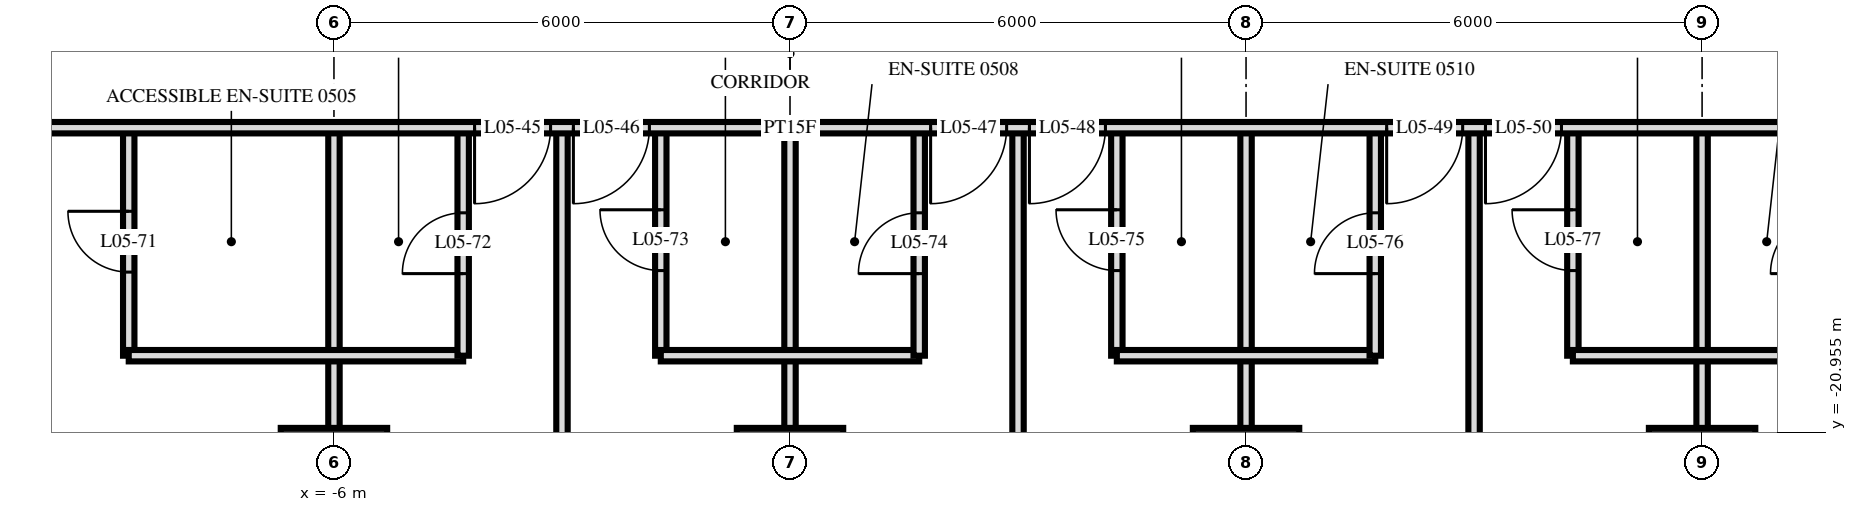
"""IFC4 building model, lengths in metres.
Left out: names, types, materials, properties, quantities, classifications, styles, units other than length and angle.
Written with IfcOpenShell. Run it as: python <this file> out.ifc"""

import sys

from ifc_helpers import new_model, si_unit, direction, frame, frame_2d, origin, origin_2d, place, context, subcontext, project, spatial, rectangle, extrude, element, fill, save


model = new_model("IFC4")
c1 = context("Model", 3, precision=1e-05, world=origin(), true_north=direction((0.0, 1.0)))
c2 = subcontext(c1, "Body", "Model", "MODEL_VIEW")
j1 = project(units=[si_unit("LENGTHUNIT", "METRE"), si_unit("PLANEANGLEUNIT", "RADIAN")], contexts=[c1])
p1 = place(None, origin())
s1 = spatial("IfcSite", under=j1, at=p1, CompositionType="ELEMENT")
p2 = place(p1, origin())
s2 = spatial("IfcBuilding", under=s1, at=p2, CompositionType="ELEMENT")
p3 = place(p2, frame((0.0, 0.0, 27.6)))
s3 = spatial("IfcBuildingStorey", under=s2, at=p3, CompositionType="ELEMENT", Elevation=27.6)
for number, where, z_axis, x_axis in (
    (1, (-6.0, -21.6, 0.0), (0.0, 0.0, 1.0), (1.0, 0.0, 0.0)),
    (2, (0.0, -21.6, 0.0), (0.0, 0.0, 1.0), (1.0, 0.0, 0.0)),
    (3, (6.0, -21.6, 0.0), (0.0, 0.0, 1.0), (1.0, 0.0, 0.0)),
    (4, (12.0, -21.6, 0.0), (0.0, 0.0, 1.0), (1.0, 0.0, 0.0)),
):
    element("IfcColumn", number, at=place(p3, frame(where, z_axis=z_axis, x_axis=x_axis)), inside=s3, PredefinedType="COLUMN", context=c2, shape_type="SweptSolid", body=[
        extrude(rectangle(XDim=1.4, YDim=1.4, at=origin_2d()), origin(), (0.0, 0.0, 1.0), 3.6),
    ])
p4 = place(p3, frame((12.0, -29.22, 0.0), z_axis=(0.0, 0.0, 1.0), x_axis=(0.0, 1.0, 0.0)))
e5 = element("IfcWall", 5, at=p4, inside=s3, PredefinedType="PARTITIONING", context=c2, shape_type="SweptSolid", body=[
    extrude(rectangle(XDim=12.27, YDim=0.15, at=frame_2d((6.135, 0.0))), origin(), (0.0, 0.0, 1.0), 3.32),
])
p5 = place(p3, frame((10.3, -19.95, 0.0), z_axis=(0.0, 0.0, 1.0), x_axis=(0.0, 1.0, 0.0)))
e6 = element("IfcWall", 6, at=p5, inside=s3, PredefinedType="PARTITIONING", context=c2, shape_type="SweptSolid", body=[
    extrude(rectangle(XDim=3.0, YDim=0.15, at=frame_2d((1.5, 0.0))), origin(), (0.0, 0.0, 1.0), 3.32),
])
p6 = place(p5, frame((1.12, 0.0, 0.0)))
e7 = element("IfcOpeningElement", 7, at=p6, cuts=e6, PredefinedType="OPENING", context=c2, shape_type="SweptSolid", body=[
    extrude(rectangle(XDim=0.8, YDim=2.1, at=frame_2d((0.4, 1.05))), frame((0.0, 0.085, 0.0), z_axis=(0.0, -1.0, 0.0), x_axis=(1.0, 0.0, 0.0)), (0.0, 0.0, 1.0), 0.17),
])
p7 = place(p3, frame((9.0, -29.22, 0.0), z_axis=(0.0, 0.0, 1.0), x_axis=(0.0, 1.0, 0.0)))
e8 = element("IfcWall", 8, at=p7, inside=s3, PredefinedType="PARTITIONING", context=c2, shape_type="SweptSolid", body=[
    extrude(rectangle(XDim=12.27, YDim=0.15, at=frame_2d((6.135, 0.0))), origin(), (0.0, 0.0, 1.0), 3.32),
])
p8 = place(p3, frame((7.7, -19.95, 0.0), z_axis=(0.0, 0.0, 1.0), x_axis=(0.0, 1.0, 0.0)))
e9 = element("IfcWall", 9, at=p8, inside=s3, PredefinedType="PARTITIONING", context=c2, shape_type="SweptSolid", body=[
    extrude(rectangle(XDim=3.0, YDim=0.15, at=frame_2d((1.5, 0.0))), origin(), (0.0, 0.0, 1.0), 3.32),
])
p9 = place(p8, frame((1.08, 0.0, 0.0)))
e10 = element("IfcOpeningElement", 10, at=p9, cuts=e9, PredefinedType="OPENING", context=c2, shape_type="SweptSolid", body=[
    extrude(rectangle(XDim=0.8, YDim=2.1, at=frame_2d((0.4, 1.05))), frame((0.0, 0.085, 0.0), z_axis=(0.0, -1.0, 0.0), x_axis=(1.0, 0.0, 0.0)), (0.0, 0.0, 1.0), 0.17),
])
p10 = place(p3, frame((6.0, -29.22, 0.0), z_axis=(0.0, 0.0, 1.0), x_axis=(0.0, 1.0, 0.0)))
e11 = element("IfcWall", 11, at=p10, inside=s3, PredefinedType="PARTITIONING", context=c2, shape_type="SweptSolid", body=[
    extrude(rectangle(XDim=12.27, YDim=0.15, at=frame_2d((6.135, 0.0))), origin(), (0.0, 0.0, 1.0), 3.32),
])
p11 = place(p3, frame((4.3, -19.95, 0.0), z_axis=(0.0, 0.0, 1.0), x_axis=(0.0, 1.0, 0.0)))
e12 = element("IfcWall", 12, at=p11, inside=s3, PredefinedType="PARTITIONING", context=c2, shape_type="SweptSolid", body=[
    extrude(rectangle(XDim=3.0, YDim=0.15, at=frame_2d((1.5, 0.0))), origin(), (0.0, 0.0, 1.0), 3.32),
])
p12 = place(p11, frame((1.12, 0.0, 0.0)))
e13 = element("IfcOpeningElement", 13, at=p12, cuts=e12, PredefinedType="OPENING", context=c2, shape_type="SweptSolid", body=[
    extrude(rectangle(XDim=0.8, YDim=2.1, at=frame_2d((0.4, 1.05))), frame((0.0, 0.085, 0.0), z_axis=(0.0, -1.0, 0.0), x_axis=(1.0, 0.0, 0.0)), (0.0, 0.0, 1.0), 0.17),
])
p13 = place(p3, frame((3.0, -29.22, 0.0), z_axis=(0.0, 0.0, 1.0), x_axis=(0.0, 1.0, 0.0)))
e14 = element("IfcWall", 14, at=p13, inside=s3, PredefinedType="PARTITIONING", context=c2, shape_type="SweptSolid", body=[
    extrude(rectangle(XDim=12.27, YDim=0.15, at=frame_2d((6.135, 0.0))), origin(), (0.0, 0.0, 1.0), 3.32),
])
p14 = place(p3, frame((1.7, -19.95, 0.0), z_axis=(0.0, 0.0, 1.0), x_axis=(0.0, 1.0, 0.0)))
e15 = element("IfcWall", 15, at=p14, inside=s3, PredefinedType="PARTITIONING", context=c2, shape_type="SweptSolid", body=[
    extrude(rectangle(XDim=3.0, YDim=0.15, at=frame_2d((1.5, 0.0))), origin(), (0.0, 0.0, 1.0), 3.32),
])
p15 = place(p14, frame((1.08, 0.0, 0.0)))
e16 = element("IfcOpeningElement", 16, at=p15, cuts=e15, PredefinedType="OPENING", context=c2, shape_type="SweptSolid", body=[
    extrude(rectangle(XDim=0.8, YDim=2.1, at=frame_2d((0.4, 1.05))), frame((0.0, 0.085, 0.0), z_axis=(0.0, -1.0, 0.0), x_axis=(1.0, 0.0, 0.0)), (0.0, 0.0, 1.0), 0.17),
])
p16 = place(p3, frame((0.0, -29.22, 0.0), z_axis=(0.0, 0.0, 1.0), x_axis=(0.0, 1.0, 0.0)))
e17 = element("IfcWall", 17, at=p16, inside=s3, PredefinedType="PARTITIONING", context=c2, shape_type="SweptSolid", body=[
    extrude(rectangle(XDim=12.27, YDim=0.15, at=frame_2d((6.135, 0.0))), origin(), (0.0, 0.0, 1.0), 3.32),
])
p17 = place(p3, frame((-1.7, -19.95, 0.0), z_axis=(0.0, 0.0, 1.0), x_axis=(0.0, 1.0, 0.0)))
e18 = element("IfcWall", 18, at=p17, inside=s3, PredefinedType="PARTITIONING", context=c2, shape_type="SweptSolid", body=[
    extrude(rectangle(XDim=3.0, YDim=0.15, at=frame_2d((1.5, 0.0))), origin(), (0.0, 0.0, 1.0), 3.32),
])
p18 = place(p17, frame((1.12, 0.0, 0.0)))
e19 = element("IfcOpeningElement", 19, at=p18, cuts=e18, PredefinedType="OPENING", context=c2, shape_type="SweptSolid", body=[
    extrude(rectangle(XDim=0.8, YDim=2.1, at=frame_2d((0.4, 1.05))), frame((0.0, 0.085, 0.0), z_axis=(0.0, -1.0, 0.0), x_axis=(1.0, 0.0, 0.0)), (0.0, 0.0, 1.0), 0.17),
])
p19 = place(p3, frame((-3.0, -29.22, 0.0), z_axis=(0.0, 0.0, 1.0), x_axis=(0.0, 1.0, 0.0)))
e20 = element("IfcWall", 20, at=p19, inside=s3, PredefinedType="PARTITIONING", context=c2, shape_type="SweptSolid", body=[
    extrude(rectangle(XDim=12.27, YDim=0.15, at=frame_2d((6.135, 0.0))), origin(), (0.0, 0.0, 1.0), 3.32),
])
p20 = place(p3, frame((-4.3, -19.95, 0.0), z_axis=(0.0, 0.0, 1.0), x_axis=(0.0, 1.0, 0.0)))
e21 = element("IfcWall", 21, at=p20, inside=s3, PredefinedType="PARTITIONING", context=c2, shape_type="SweptSolid", body=[
    extrude(rectangle(XDim=3.0, YDim=0.15, at=frame_2d((1.5, 0.0))), origin(), (0.0, 0.0, 1.0), 3.32),
])
p21 = place(p20, frame((1.08, 0.0, 0.0)))
e22 = element("IfcOpeningElement", 22, at=p21, cuts=e21, PredefinedType="OPENING", context=c2, shape_type="SweptSolid", body=[
    extrude(rectangle(XDim=0.8, YDim=2.1, at=frame_2d((0.4, 1.05))), frame((0.0, 0.085, 0.0), z_axis=(0.0, -1.0, 0.0), x_axis=(1.0, 0.0, 0.0)), (0.0, 0.0, 1.0), 0.17),
])
p22 = place(p3, frame((-6.0, -29.22, 0.0), z_axis=(0.0, 0.0, 1.0), x_axis=(0.0, 1.0, 0.0)))
e23 = element("IfcWall", 23, at=p22, inside=s3, PredefinedType="PARTITIONING", context=c2, shape_type="SweptSolid", body=[
    extrude(rectangle(XDim=12.27, YDim=0.15, at=frame_2d((6.135, 0.0))), origin(), (0.0, 0.0, 1.0), 3.32),
])
p23 = place(p3, frame((-8.7, -19.95, 0.0), z_axis=(0.0, 0.0, 1.0), x_axis=(0.0, 1.0, 0.0)))
e24 = element("IfcWall", 24, at=p23, inside=s3, PredefinedType="PARTITIONING", context=c2, shape_type="SweptSolid", body=[
    extrude(rectangle(XDim=3.0, YDim=0.15, at=frame_2d((1.5, 0.0))), origin(), (0.0, 0.0, 1.0), 3.32),
])
p24 = place(p23, frame((1.1, 0.0, 0.0)))
e25 = element("IfcOpeningElement", 25, at=p24, cuts=e24, PredefinedType="OPENING", context=c2, shape_type="SweptSolid", body=[
    extrude(rectangle(XDim=0.8, YDim=2.1, at=frame_2d((0.4, 1.05))), frame((0.0, 0.085, 0.0), z_axis=(0.0, -1.0, 0.0), x_axis=(1.0, 0.0, 0.0)), (0.0, 0.0, 1.0), 0.17),
])
p25 = place(p3, frame((-8.7, -19.95, 0.0), z_axis=(0.0, 0.0, 1.0), x_axis=(1.0, 0.0, 0.0)))
e26 = element("IfcWall", 26, at=p25, inside=s3, PredefinedType="PARTITIONING", context=c2, shape_type="SweptSolid", body=[
    extrude(rectangle(XDim=4.4, YDim=0.15, at=frame_2d((2.2, 0.0))), origin(), (0.0, 0.0, 1.0), 3.32),
])
for number, where, z_axis, x_axis in (
    (27, (-1.7, -19.95, 0.0), (0.0, 0.0, 1.0), (1.0, 0.0, 0.0)),
    (28, (4.3, -19.95, 0.0), (0.0, 0.0, 1.0), (1.0, 0.0, 0.0)),
    (29, (10.3, -19.95, 0.0), (0.0, 0.0, 1.0), (1.0, 0.0, 0.0)),
):
    element("IfcWall", number, at=place(p3, frame(where, z_axis=z_axis, x_axis=x_axis)), inside=s3, PredefinedType="PARTITIONING", context=c2, shape_type="SweptSolid", body=[
        extrude(rectangle(XDim=3.4, YDim=0.15, at=frame_2d((1.7, 0.0))), origin(), (0.0, 0.0, 1.0), 3.32),
    ])
p26 = place(p3, frame((-33.12, -16.95, 0.0), z_axis=(0.0, 0.0, 1.0), x_axis=(1.0, 0.0, 0.0)))
e30 = element("IfcWall", 30, at=p26, inside=s3, PredefinedType="PARTITIONING", context=c2, shape_type="SweptSolid", body=[
    extrude(rectangle(XDim=66.24, YDim=0.15, at=frame_2d((33.12, 0.0))), origin(), (0.0, 0.0, 1.0), 3.32),
])
p27 = place(p26, frame((9.27, 0.0, 0.0)))
e31 = element("IfcOpeningElement", 31, at=p27, cuts=e30, PredefinedType="OPENING", context=c2, shape_type="SweptSolid", body=[
    extrude(rectangle(XDim=1.0, YDim=2.1, at=frame_2d((0.5, 1.05))), frame((0.0, 0.085, 0.0), z_axis=(0.0, -1.0, 0.0), x_axis=(1.0, 0.0, 0.0)), (0.0, 0.0, 1.0), 0.17),
])
p28 = place(p26, frame((13.97, 0.0, 0.0)))
e32 = element("IfcOpeningElement", 32, at=p28, cuts=e30, PredefinedType="OPENING", context=c2, shape_type="SweptSolid", body=[
    extrude(rectangle(XDim=1.0, YDim=2.1, at=frame_2d((0.5, 1.05))), frame((0.0, 0.085, 0.0), z_axis=(0.0, -1.0, 0.0), x_axis=(1.0, 0.0, 0.0)), (0.0, 0.0, 1.0), 0.17),
])
p29 = place(p26, frame((15.27, 0.0, 0.0)))
e33 = element("IfcOpeningElement", 33, at=p29, cuts=e30, PredefinedType="OPENING", context=c2, shape_type="SweptSolid", body=[
    extrude(rectangle(XDim=1.0, YDim=2.1, at=frame_2d((0.5, 1.05))), frame((0.0, 0.085, 0.0), z_axis=(0.0, -1.0, 0.0), x_axis=(1.0, 0.0, 0.0)), (0.0, 0.0, 1.0), 0.17),
])
p30 = place(p26, frame((19.97, 0.0, 0.0)))
e34 = element("IfcOpeningElement", 34, at=p30, cuts=e30, PredefinedType="OPENING", context=c2, shape_type="SweptSolid", body=[
    extrude(rectangle(XDim=1.0, YDim=2.1, at=frame_2d((0.5, 1.05))), frame((0.0, 0.085, 0.0), z_axis=(0.0, -1.0, 0.0), x_axis=(1.0, 0.0, 0.0)), (0.0, 0.0, 1.0), 0.17),
])
p31 = place(p26, frame((22.27, 0.0, 0.0)))
e35 = element("IfcOpeningElement", 35, at=p31, cuts=e30, PredefinedType="OPENING", context=c2, shape_type="SweptSolid", body=[
    extrude(rectangle(XDim=1.0, YDim=2.1, at=frame_2d((0.5, 1.05))), frame((0.0, 0.085, 0.0), z_axis=(0.0, -1.0, 0.0), x_axis=(1.0, 0.0, 0.0)), (0.0, 0.0, 1.0), 0.17),
])
p32 = place(p26, frame((28.97, 0.0, 0.0)))
e36 = element("IfcOpeningElement", 36, at=p32, cuts=e30, PredefinedType="OPENING", context=c2, shape_type="SweptSolid", body=[
    extrude(rectangle(XDim=1.0, YDim=2.1, at=frame_2d((0.5, 1.05))), frame((0.0, 0.085, 0.0), z_axis=(0.0, -1.0, 0.0), x_axis=(1.0, 0.0, 0.0)), (0.0, 0.0, 1.0), 0.17),
])
p33 = place(p26, frame((30.27, 0.0, 0.0)))
e37 = element("IfcOpeningElement", 37, at=p33, cuts=e30, PredefinedType="OPENING", context=c2, shape_type="SweptSolid", body=[
    extrude(rectangle(XDim=1.0, YDim=2.1, at=frame_2d((0.5, 1.05))), frame((0.0, 0.085, 0.0), z_axis=(0.0, -1.0, 0.0), x_axis=(1.0, 0.0, 0.0)), (0.0, 0.0, 1.0), 0.17),
])
p34 = place(p26, frame((34.97, 0.0, 0.0)))
e38 = element("IfcOpeningElement", 38, at=p34, cuts=e30, PredefinedType="OPENING", context=c2, shape_type="SweptSolid", body=[
    extrude(rectangle(XDim=1.0, YDim=2.1, at=frame_2d((0.5, 1.05))), frame((0.0, 0.085, 0.0), z_axis=(0.0, -1.0, 0.0), x_axis=(1.0, 0.0, 0.0)), (0.0, 0.0, 1.0), 0.17),
])
p35 = place(p26, frame((36.27, 0.0, 0.0)))
e39 = element("IfcOpeningElement", 39, at=p35, cuts=e30, PredefinedType="OPENING", context=c2, shape_type="SweptSolid", body=[
    extrude(rectangle(XDim=1.0, YDim=2.1, at=frame_2d((0.5, 1.05))), frame((0.0, 0.085, 0.0), z_axis=(0.0, -1.0, 0.0), x_axis=(1.0, 0.0, 0.0)), (0.0, 0.0, 1.0), 0.17),
])
p36 = place(p26, frame((40.97, 0.0, 0.0)))
e40 = element("IfcOpeningElement", 40, at=p36, cuts=e30, PredefinedType="OPENING", context=c2, shape_type="SweptSolid", body=[
    extrude(rectangle(XDim=1.0, YDim=2.1, at=frame_2d((0.5, 1.05))), frame((0.0, 0.085, 0.0), z_axis=(0.0, -1.0, 0.0), x_axis=(1.0, 0.0, 0.0)), (0.0, 0.0, 1.0), 0.17),
])
p37 = place(p26, frame((42.27, 0.0, 0.0)))
e41 = element("IfcOpeningElement", 41, at=p37, cuts=e30, PredefinedType="OPENING", context=c2, shape_type="SweptSolid", body=[
    extrude(rectangle(XDim=1.0, YDim=2.1, at=frame_2d((0.5, 1.05))), frame((0.0, 0.085, 0.0), z_axis=(0.0, -1.0, 0.0), x_axis=(1.0, 0.0, 0.0)), (0.0, 0.0, 1.0), 0.17),
])
p38 = place(p26, frame((46.97, 0.0, 0.0)))
e42 = element("IfcOpeningElement", 42, at=p38, cuts=e30, PredefinedType="OPENING", context=c2, shape_type="SweptSolid", body=[
    extrude(rectangle(XDim=1.0, YDim=2.1, at=frame_2d((0.5, 1.05))), frame((0.0, 0.085, 0.0), z_axis=(0.0, -1.0, 0.0), x_axis=(1.0, 0.0, 0.0)), (0.0, 0.0, 1.0), 0.17),
])
p39 = place(p26, frame((48.27, 0.0, 0.0)))
e43 = element("IfcOpeningElement", 43, at=p39, cuts=e30, PredefinedType="OPENING", context=c2, shape_type="SweptSolid", body=[
    extrude(rectangle(XDim=1.0, YDim=2.1, at=frame_2d((0.5, 1.05))), frame((0.0, 0.085, 0.0), z_axis=(0.0, -1.0, 0.0), x_axis=(1.0, 0.0, 0.0)), (0.0, 0.0, 1.0), 0.17),
])
p40 = place(p26, frame((52.97, 0.0, 0.0)))
e44 = element("IfcOpeningElement", 44, at=p40, cuts=e30, PredefinedType="OPENING", context=c2, shape_type="SweptSolid", body=[
    extrude(rectangle(XDim=1.0, YDim=2.1, at=frame_2d((0.5, 1.05))), frame((0.0, 0.085, 0.0), z_axis=(0.0, -1.0, 0.0), x_axis=(1.0, 0.0, 0.0)), (0.0, 0.0, 1.0), 0.17),
])
p41 = place(p26, frame((54.27, 0.0, 0.0)))
e45 = element("IfcOpeningElement", 45, at=p41, cuts=e30, PredefinedType="OPENING", context=c2, shape_type="SweptSolid", body=[
    extrude(rectangle(XDim=1.0, YDim=2.1, at=frame_2d((0.5, 1.05))), frame((0.0, 0.085, 0.0), z_axis=(0.0, -1.0, 0.0), x_axis=(1.0, 0.0, 0.0)), (0.0, 0.0, 1.0), 0.17),
])
p42 = place(p26, frame((4.4, 0.0, 0.0)))
e46 = element("IfcOpeningElement", 46, at=p42, cuts=e30, PredefinedType="OPENING", context=c2, shape_type="SweptSolid", body=[
    extrude(rectangle(XDim=1.0, YDim=2.1, at=frame_2d((0.5, 1.05))), frame((0.0, 0.085, 0.0), z_axis=(0.0, -1.0, 0.0), x_axis=(1.0, 0.0, 0.0)), (0.0, 0.0, 1.0), 0.17),
])
p43 = place(p26, frame((60.8, 0.0, 0.0)))
e47 = element("IfcOpeningElement", 47, at=p43, cuts=e30, PredefinedType="OPENING", context=c2, shape_type="SweptSolid", body=[
    extrude(rectangle(XDim=1.0, YDim=2.1, at=frame_2d((0.5, 1.05))), frame((0.0, 0.085, 0.0), z_axis=(0.0, -1.0, 0.0), x_axis=(1.0, 0.0, 0.0)), (0.0, 0.0, 1.0), 0.17),
])
p44 = place(p32, frame((0.5, 0.0, 0.0), z_axis=(0.0, 0.0, 1.0), x_axis=(-1.0, 0.0, 0.0)))
e48 = element("IfcDoor", 48, at=p44, inside=s3, OperationType="SINGLE_SWING_LEFT", PredefinedType="DOOR", context=c2, shape_type="SweptSolid", body=[
    extrude(rectangle(XDim=1.0, YDim=2.1, at=frame_2d((0.0, 1.05))), frame((0.0, -0.025, 0.0), z_axis=(0.0, 1.0, 0.0), x_axis=(-1.0, 0.0, 0.0)), (0.0, 0.0, 1.0), 0.05),
])
fill(e36, e48)
p45 = place(p33, frame((0.5, 0.0, 0.0), z_axis=(0.0, 0.0, 1.0), x_axis=(-1.0, 0.0, 0.0)))
e49 = element("IfcDoor", 49, at=p45, inside=s3, OperationType="SINGLE_SWING_LEFT", PredefinedType="DOOR", context=c2, shape_type="SweptSolid", body=[
    extrude(rectangle(XDim=1.0, YDim=2.1, at=frame_2d((0.0, 1.05))), frame((0.0, -0.025, 0.0), z_axis=(0.0, 1.0, 0.0), x_axis=(-1.0, 0.0, 0.0)), (0.0, 0.0, 1.0), 0.05),
])
fill(e37, e49)
p46 = place(p34, frame((0.5, 0.0, 0.0), z_axis=(0.0, 0.0, 1.0), x_axis=(-1.0, 0.0, 0.0)))
e50 = element("IfcDoor", 50, at=p46, inside=s3, OperationType="SINGLE_SWING_LEFT", PredefinedType="DOOR", context=c2, shape_type="SweptSolid", body=[
    extrude(rectangle(XDim=1.0, YDim=2.1, at=frame_2d((0.0, 1.05))), frame((0.0, -0.025, 0.0), z_axis=(0.0, 1.0, 0.0), x_axis=(-1.0, 0.0, 0.0)), (0.0, 0.0, 1.0), 0.05),
])
fill(e38, e50)
p47 = place(p35, frame((0.5, 0.0, 0.0), z_axis=(0.0, 0.0, 1.0), x_axis=(-1.0, 0.0, 0.0)))
e51 = element("IfcDoor", 51, at=p47, inside=s3, OperationType="SINGLE_SWING_LEFT", PredefinedType="DOOR", context=c2, shape_type="SweptSolid", body=[
    extrude(rectangle(XDim=1.0, YDim=2.1, at=frame_2d((0.0, 1.05))), frame((0.0, -0.025, 0.0), z_axis=(0.0, 1.0, 0.0), x_axis=(-1.0, 0.0, 0.0)), (0.0, 0.0, 1.0), 0.05),
])
fill(e39, e51)
p48 = place(p36, frame((0.5, 0.0, 0.0), z_axis=(0.0, 0.0, 1.0), x_axis=(-1.0, 0.0, 0.0)))
e52 = element("IfcDoor", 52, at=p48, inside=s3, OperationType="SINGLE_SWING_LEFT", PredefinedType="DOOR", context=c2, shape_type="SweptSolid", body=[
    extrude(rectangle(XDim=1.0, YDim=2.1, at=frame_2d((0.0, 1.05))), frame((0.0, -0.025, 0.0), z_axis=(0.0, 1.0, 0.0), x_axis=(-1.0, 0.0, 0.0)), (0.0, 0.0, 1.0), 0.05),
])
fill(e40, e52)
p49 = place(p37, frame((0.5, 0.0, 0.0), z_axis=(0.0, 0.0, 1.0), x_axis=(-1.0, 0.0, 0.0)))
e53 = element("IfcDoor", 53, at=p49, inside=s3, OperationType="SINGLE_SWING_LEFT", PredefinedType="DOOR", context=c2, shape_type="SweptSolid", body=[
    extrude(rectangle(XDim=1.0, YDim=2.1, at=frame_2d((0.0, 1.05))), frame((0.0, -0.025, 0.0), z_axis=(0.0, 1.0, 0.0), x_axis=(-1.0, 0.0, 0.0)), (0.0, 0.0, 1.0), 0.05),
])
fill(e41, e53)
p50 = place(p24, origin())
e54 = element("IfcDoor", 54, at=p50, inside=s3, OperationType="SINGLE_SWING_LEFT", PredefinedType="DOOR", context=c2, shape_type="SweptSolid", body=[
    extrude(rectangle(XDim=0.8, YDim=2.1, at=frame_2d((0.4, 1.05))), frame((0.0, 0.025, 0.0), z_axis=(0.0, -1.0, 0.0), x_axis=(1.0, 0.0, 0.0)), (0.0, 0.0, 1.0), 0.05),
])
fill(e25, e54)
p51 = place(p21, origin())
e55 = element("IfcDoor", 55, at=p51, inside=s3, OperationType="SINGLE_SWING_RIGHT", PredefinedType="DOOR", context=c2, shape_type="SweptSolid", body=[
    extrude(rectangle(XDim=0.8, YDim=2.1, at=frame_2d((0.4, 1.05))), frame((0.0, 0.025, 0.0), z_axis=(0.0, -1.0, 0.0), x_axis=(1.0, 0.0, 0.0)), (0.0, 0.0, 1.0), 0.05),
])
fill(e22, e55)
p52 = place(p18, origin())
e56 = element("IfcDoor", 56, at=p52, inside=s3, OperationType="SINGLE_SWING_LEFT", PredefinedType="DOOR", context=c2, shape_type="SweptSolid", body=[
    extrude(rectangle(XDim=0.8, YDim=2.1, at=frame_2d((0.4, 1.05))), frame((0.0, 0.025, 0.0), z_axis=(0.0, -1.0, 0.0), x_axis=(1.0, 0.0, 0.0)), (0.0, 0.0, 1.0), 0.05),
])
fill(e19, e56)
p53 = place(p15, origin())
e57 = element("IfcDoor", 57, at=p53, inside=s3, OperationType="SINGLE_SWING_RIGHT", PredefinedType="DOOR", context=c2, shape_type="SweptSolid", body=[
    extrude(rectangle(XDim=0.8, YDim=2.1, at=frame_2d((0.4, 1.05))), frame((0.0, 0.025, 0.0), z_axis=(0.0, -1.0, 0.0), x_axis=(1.0, 0.0, 0.0)), (0.0, 0.0, 1.0), 0.05),
])
fill(e16, e57)
p54 = place(p12, origin())
e58 = element("IfcDoor", 58, at=p54, inside=s3, OperationType="SINGLE_SWING_LEFT", PredefinedType="DOOR", context=c2, shape_type="SweptSolid", body=[
    extrude(rectangle(XDim=0.8, YDim=2.1, at=frame_2d((0.4, 1.05))), frame((0.0, 0.025, 0.0), z_axis=(0.0, -1.0, 0.0), x_axis=(1.0, 0.0, 0.0)), (0.0, 0.0, 1.0), 0.05),
])
fill(e13, e58)
p55 = place(p9, origin())
e59 = element("IfcDoor", 59, at=p55, inside=s3, OperationType="SINGLE_SWING_RIGHT", PredefinedType="DOOR", context=c2, shape_type="SweptSolid", body=[
    extrude(rectangle(XDim=0.8, YDim=2.1, at=frame_2d((0.4, 1.05))), frame((0.0, 0.025, 0.0), z_axis=(0.0, -1.0, 0.0), x_axis=(1.0, 0.0, 0.0)), (0.0, 0.0, 1.0), 0.05),
])
fill(e10, e59)
p56 = place(p6, origin())
e60 = element("IfcDoor", 60, at=p56, inside=s3, OperationType="SINGLE_SWING_LEFT", PredefinedType="DOOR", context=c2, shape_type="SweptSolid", body=[
    extrude(rectangle(XDim=0.8, YDim=2.1, at=frame_2d((0.4, 1.05))), frame((0.0, 0.025, 0.0), z_axis=(0.0, -1.0, 0.0), x_axis=(1.0, 0.0, 0.0)), (0.0, 0.0, 1.0), 0.05),
])
fill(e7, e60)
save(model, sys.argv[1])
